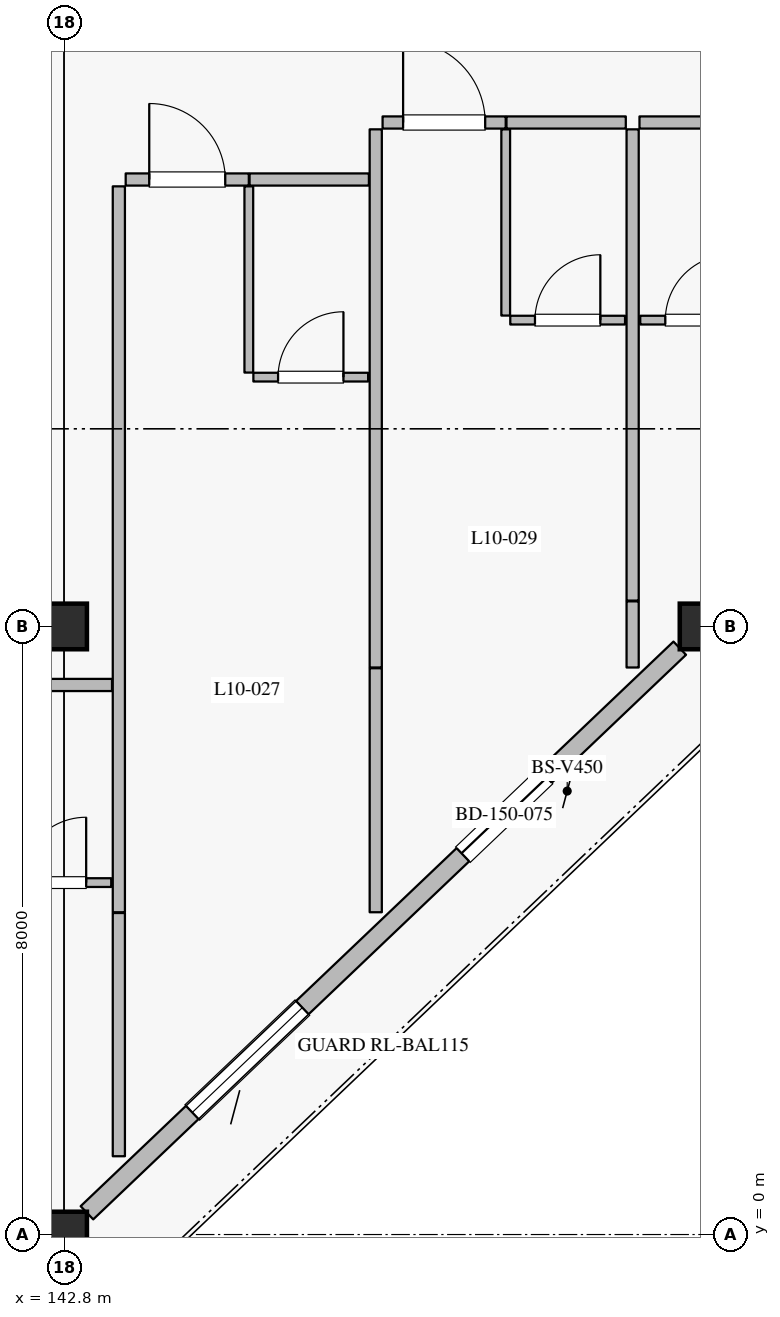
"""IFC4 building model, lengths in metres.
Left out: names, types, materials, properties, quantities, classifications, styles, units other than length and angle.
Written with IfcOpenShell. Run it as: python <this file> out.ifc"""

import sys

from ifc_helpers import new_model, si_unit, direction, frame, frame_2d, origin, origin_2d, place, context, subcontext, project, spatial, rectangle, extrude, element, fill, save


model = new_model("IFC4")
c1 = context("Model", 3, precision=1e-05, world=origin(), true_north=direction((0.0, 1.0)))
c2 = subcontext(c1, "Body", "Model", "MODEL_VIEW")
j1 = project(units=[si_unit("LENGTHUNIT", "METRE"), si_unit("PLANEANGLEUNIT", "RADIAN")], contexts=[c1])
p1 = place(None, origin())
s1 = spatial("IfcSite", under=j1, at=p1, CompositionType="ELEMENT")
p2 = place(p1, origin())
s2 = spatial("IfcBuilding", under=s1, at=p2, CompositionType="ELEMENT")
p3 = place(p2, frame((0.0, 0.0, 43.2)))
s3 = spatial("IfcBuildingStorey", under=s2, at=p3, CompositionType="ELEMENT", Elevation=43.2)
for number, where, z_axis, x_axis in (
    (1, (142.8, 0.0, 0.0), (0.0, 0.0, 1.0), (1.0, 0.0, 0.0)),
    (2, (151.2, 8.0, 0.0), (0.0, 0.0, 1.0), (1.0, 0.0, 0.0)),
    (3, (142.8, 8.0, 0.0), (0.0, 0.0, 1.0), (1.0, 0.0, 0.0)),
):
    element("IfcColumn", number, at=place(p3, frame(where, z_axis=z_axis, x_axis=x_axis)), inside=s3, PredefinedType="COLUMN", context=c2, shape_type="SweptSolid", body=[
        extrude(rectangle(XDim=0.6, YDim=0.6, at=origin_2d()), origin(), (0.0, 0.0, 1.0), 4.2),
    ])
p4 = place(p3, frame((150.9, 7.714, 0.0), z_axis=(0.0, 0.0, 1.0), x_axis=(-0.724145477467, -0.689647248573, 0.0)))
e4 = element("IfcWall", 4, at=p4, inside=s3, PredefinedType="SOLIDWALL", context=c2, shape_type="SweptSolid", body=[
    extrude(rectangle(XDim=10.771, YDim=0.24, at=frame_2d((5.385, 0.0))), origin(), (0.0, 0.0, 1.0), 3.54),
])
p5 = place(p4, frame((2.44, 0.0, 0.0)))
e5 = element("IfcOpeningElement", 5, at=p5, cuts=e4, PredefinedType="OPENING", context=c2, shape_type="SweptSolid", body=[
    extrude(rectangle(XDim=1.5, YDim=2.25, at=frame_2d((0.75, 1.125))), frame((0.0, 0.13, 0.0), z_axis=(0.0, -1.0, 0.0), x_axis=(1.0, 0.0, 0.0)), (0.0, 0.0, 1.0), 0.26),
])
p6 = place(p4, frame((6.857, 0.0, 0.8)))
e6 = element("IfcOpeningElement", 6, at=p6, cuts=e4, PredefinedType="OPENING", context=c2, shape_type="SweptSolid", body=[
    extrude(rectangle(XDim=2.0, YDim=1.75, at=frame_2d((1.0, 0.875))), frame((0.0, 0.13, 0.0), z_axis=(0.0, -1.0, 0.0), x_axis=(1.0, 0.0, 0.0)), (0.0, 0.0, 1.0), 0.26),
])
p7 = place(p3, frame((141.85, 7.23, 0.0), z_axis=(0.0, 0.0, 1.0), x_axis=(1.0, 0.0, 0.0)))
e7 = element("IfcWall", 7, at=p7, inside=s3, PredefinedType="PARTITIONING", context=c2, shape_type="SweptSolid", body=[
    extrude(rectangle(XDim=1.58, YDim=0.16, at=frame_2d((0.79, 0.0))), origin(), (0.0, 0.0, 1.0), 3.935),
])
p8 = place(p3, frame((141.9, 4.63, 0.0), z_axis=(0.0, 0.0, 1.0), x_axis=(1.0, 0.0, 0.0)))
e8 = element("IfcWall", 8, at=p8, inside=s3, PredefinedType="PARTITIONING", context=c2, shape_type="SweptSolid", body=[
    extrude(rectangle(XDim=1.52, YDim=0.115, at=frame_2d((0.76, 0.0))), origin(), (0.0, 0.0, 1.0), 3.935),
])
p9 = place(p8, frame((0.33, 0.0, 0.0)))
e9 = element("IfcOpeningElement", 9, at=p9, cuts=e8, PredefinedType="OPENING", context=c2, shape_type="SweptSolid", body=[
    extrude(rectangle(XDim=0.86, YDim=2.12, at=frame_2d((0.43, 1.06))), frame((0.0, 0.067, 0.0), z_axis=(0.0, -1.0, 0.0), x_axis=(1.0, 0.0, 0.0)), (0.0, 0.0, 1.0), 0.135),
])
p10 = place(p3, frame((143.52, 1.03, 0.0), z_axis=(0.0, 0.0, 1.0), x_axis=(0.0, 1.0, 0.0)))
e10 = element("IfcWall", 10, at=p10, inside=s3, PredefinedType="PARTITIONING", context=c2, shape_type="SweptSolid", body=[
    extrude(rectangle(XDim=3.2, YDim=0.16, at=frame_2d((1.6, 0.0))), origin(), (0.0, 0.0, 1.0), 3.935),
])
p11 = place(p3, frame((143.61, 13.88, 0.0), z_axis=(0.0, 0.0, 1.0), x_axis=(1.0, 0.0, 0.0)))
e11 = element("IfcWall", 11, at=p11, inside=s3, PredefinedType="PARTITIONING", context=c2, shape_type="SweptSolid", body=[
    extrude(rectangle(XDim=1.62, YDim=0.16, at=frame_2d((0.81, 0.0))), origin(), (0.0, 0.0, 1.0), 3.935),
])
p12 = place(p11, frame((0.31, 0.0, 0.0)))
e12 = element("IfcOpeningElement", 12, at=p12, cuts=e11, PredefinedType="OPENING", context=c2, shape_type="SweptSolid", body=[
    extrude(rectangle(XDim=1.0, YDim=2.25, at=frame_2d((0.5, 1.125))), frame((0.0, 0.09, 0.0), z_axis=(0.0, -1.0, 0.0), x_axis=(1.0, 0.0, 0.0)), (0.0, 0.0, 1.0), 0.18),
])
p13 = place(p3, frame((145.24, 13.88, 0.0), z_axis=(0.0, 0.0, 1.0), x_axis=(1.0, 0.0, 0.0)))
e13 = element("IfcWall", 13, at=p13, inside=s3, PredefinedType="PARTITIONING", context=c2, shape_type="SweptSolid", body=[
    extrude(rectangle(XDim=1.57, YDim=0.16, at=frame_2d((0.785, 0.0))), origin(), (0.0, 0.0, 1.0), 3.935),
])
p14 = place(p3, frame((145.23, 11.34, 0.0), z_axis=(0.0, 0.0, 1.0), x_axis=(0.0, 1.0, 0.0)))
e14 = element("IfcWall", 14, at=p14, inside=s3, PredefinedType="PARTITIONING", context=c2, shape_type="SweptSolid", body=[
    extrude(rectangle(XDim=2.45, YDim=0.115, at=frame_2d((1.225, 0.0))), origin(), (0.0, 0.0, 1.0), 3.935),
])
p15 = place(p3, frame((145.29, 11.28, 0.0), z_axis=(0.0, 0.0, 1.0), x_axis=(1.0, 0.0, 0.0)))
e15 = element("IfcWall", 15, at=p15, inside=s3, PredefinedType="PARTITIONING", context=c2, shape_type="SweptSolid", body=[
    extrude(rectangle(XDim=1.51, YDim=0.115, at=frame_2d((0.755, 0.0))), origin(), (0.0, 0.0, 1.0), 3.935),
])
p16 = place(p15, frame((0.325, 0.0, 0.0)))
e16 = element("IfcOpeningElement", 16, at=p16, cuts=e15, PredefinedType="OPENING", context=c2, shape_type="SweptSolid", body=[
    extrude(rectangle(XDim=0.86, YDim=2.12, at=frame_2d((0.43, 1.06))), frame((0.0, 0.067, 0.0), z_axis=(0.0, -1.0, 0.0), x_axis=(1.0, 0.0, 0.0)), (0.0, 0.0, 1.0), 0.135),
])
p17 = place(p3, frame((143.52, 4.24, 0.0), z_axis=(0.0, 0.0, 1.0), x_axis=(0.0, 1.0, 0.0)))
e17 = element("IfcWall", 17, at=p17, inside=s3, PredefinedType="PARTITIONING", context=c2, shape_type="SweptSolid", body=[
    extrude(rectangle(XDim=9.55, YDim=0.16, at=frame_2d((4.775, 0.0))), origin(), (0.0, 0.0, 1.0), 3.935),
])
p18 = place(p3, frame((146.9, 4.24, 0.0), z_axis=(0.0, 0.0, 1.0), x_axis=(0.0, 1.0, 0.0)))
e18 = element("IfcWall", 18, at=p18, inside=s3, PredefinedType="PARTITIONING", context=c2, shape_type="SweptSolid", body=[
    extrude(rectangle(XDim=3.21, YDim=0.16, at=frame_2d((1.605, 0.0))), origin(), (0.0, 0.0, 1.0), 3.935),
])
p19 = place(p3, frame((146.99, 14.63, 0.0), z_axis=(0.0, 0.0, 1.0), x_axis=(1.0, 0.0, 0.0)))
e19 = element("IfcWall", 19, at=p19, inside=s3, PredefinedType="PARTITIONING", context=c2, shape_type="SweptSolid", body=[
    extrude(rectangle(XDim=1.62, YDim=0.16, at=frame_2d((0.81, 0.0))), origin(), (0.0, 0.0, 1.0), 3.935),
])
p20 = place(p19, frame((0.27, 0.0, 0.0)))
e20 = element("IfcOpeningElement", 20, at=p20, cuts=e19, PredefinedType="OPENING", context=c2, shape_type="SweptSolid", body=[
    extrude(rectangle(XDim=1.08, YDim=2.3, at=frame_2d((0.54, 1.15))), frame((0.0, 0.09, 0.0), z_axis=(0.0, -1.0, 0.0), x_axis=(1.0, 0.0, 0.0)), (0.0, 0.0, 1.0), 0.18),
])
p21 = place(p3, frame((148.62, 14.63, 0.0), z_axis=(0.0, 0.0, 1.0), x_axis=(1.0, 0.0, 0.0)))
e21 = element("IfcWall", 21, at=p21, inside=s3, PredefinedType="PARTITIONING", context=c2, shape_type="SweptSolid", body=[
    extrude(rectangle(XDim=1.57, YDim=0.16, at=frame_2d((0.785, 0.0))), origin(), (0.0, 0.0, 1.0), 3.935),
])
p22 = place(p3, frame((148.61, 12.09, 0.0), z_axis=(0.0, 0.0, 1.0), x_axis=(0.0, 1.0, 0.0)))
e22 = element("IfcWall", 22, at=p22, inside=s3, PredefinedType="PARTITIONING", context=c2, shape_type="SweptSolid", body=[
    extrude(rectangle(XDim=2.45, YDim=0.115, at=frame_2d((1.225, 0.0))), origin(), (0.0, 0.0, 1.0), 3.935),
])
p23 = place(p3, frame((148.67, 12.03, 0.0), z_axis=(0.0, 0.0, 1.0), x_axis=(1.0, 0.0, 0.0)))
e23 = element("IfcWall", 23, at=p23, inside=s3, PredefinedType="PARTITIONING", context=c2, shape_type="SweptSolid", body=[
    extrude(rectangle(XDim=1.51, YDim=0.115, at=frame_2d((0.755, 0.0))), origin(), (0.0, 0.0, 1.0), 3.935),
])
p24 = place(p23, frame((0.325, 0.0, 0.0)))
e24 = element("IfcOpeningElement", 24, at=p24, cuts=e23, PredefinedType="OPENING", context=c2, shape_type="SweptSolid", body=[
    extrude(rectangle(XDim=0.86, YDim=2.12, at=frame_2d((0.43, 1.06))), frame((0.0, 0.067, 0.0), z_axis=(0.0, -1.0, 0.0), x_axis=(1.0, 0.0, 0.0)), (0.0, 0.0, 1.0), 0.135),
])
p25 = place(p3, frame((146.9, 7.46, 0.0), z_axis=(0.0, 0.0, 1.0), x_axis=(0.0, 1.0, 0.0)))
e25 = element("IfcWall", 25, at=p25, inside=s3, PredefinedType="PARTITIONING", context=c2, shape_type="SweptSolid", body=[
    extrude(rectangle(XDim=7.08, YDim=0.16, at=frame_2d((3.54, 0.0))), origin(), (0.0, 0.0, 1.0), 3.935),
])
p26 = place(p3, frame((150.28, 7.46, 0.0), z_axis=(0.0, 0.0, 1.0), x_axis=(0.0, 1.0, 0.0)))
e26 = element("IfcWall", 26, at=p26, inside=s3, PredefinedType="PARTITIONING", context=c2, shape_type="SweptSolid", body=[
    extrude(rectangle(XDim=0.87, YDim=0.16, at=frame_2d((0.435, 0.0))), origin(), (0.0, 0.0, 1.0), 3.935),
])
p27 = place(p3, frame((150.37, 14.63, 0.0), z_axis=(0.0, 0.0, 1.0), x_axis=(1.0, 0.0, 0.0)))
e27 = element("IfcWall", 27, at=p27, inside=s3, PredefinedType="PARTITIONING", context=c2, shape_type="SweptSolid", body=[
    extrude(rectangle(XDim=1.58, YDim=0.16, at=frame_2d((0.79, 0.0))), origin(), (0.0, 0.0, 1.0), 3.935),
])
p28 = place(p3, frame((150.38, 12.03, 0.0), z_axis=(0.0, 0.0, 1.0), x_axis=(1.0, 0.0, 0.0)))
e28 = element("IfcWall", 28, at=p28, inside=s3, PredefinedType="PARTITIONING", context=c2, shape_type="SweptSolid", body=[
    extrude(rectangle(XDim=1.52, YDim=0.115, at=frame_2d((0.76, 0.0))), origin(), (0.0, 0.0, 1.0), 3.935),
])
p29 = place(p28, frame((0.33, 0.0, 0.0)))
e29 = element("IfcOpeningElement", 29, at=p29, cuts=e28, PredefinedType="OPENING", context=c2, shape_type="SweptSolid", body=[
    extrude(rectangle(XDim=0.86, YDim=2.12, at=frame_2d((0.43, 1.06))), frame((0.0, 0.067, 0.0), z_axis=(0.0, -1.0, 0.0), x_axis=(1.0, 0.0, 0.0)), (0.0, 0.0, 1.0), 0.135),
])
p30 = place(p3, frame((150.28, 8.34, 0.0), z_axis=(0.0, 0.0, 1.0), x_axis=(0.0, 1.0, 0.0)))
e30 = element("IfcWall", 30, at=p30, inside=s3, PredefinedType="PARTITIONING", context=c2, shape_type="SweptSolid", body=[
    extrude(rectangle(XDim=6.2, YDim=0.16, at=frame_2d((3.1, 0.0))), origin(), (0.0, 0.0, 1.0), 3.935),
])
p31 = place(p5, origin())
e31 = element("IfcDoor", 31, at=p31, inside=s3, OperationType="SLIDING_TO_LEFT", PredefinedType="DOOR", context=c2, shape_type="SweptSolid", body=[
    extrude(rectangle(XDim=1.5, YDim=2.25, at=frame_2d((0.75, 1.125))), frame((0.0, 0.025, 0.0), z_axis=(0.0, -1.0, 0.0), x_axis=(1.0, 0.0, 0.0)), (0.0, 0.0, 1.0), 0.05),
])
fill(e5, e31)
p32 = place(p6, origin())
e32 = element("IfcWindow", 32, at=p32, inside=s3, PartitioningType="DOUBLE_PANEL_VERTICAL", PredefinedType="WINDOW", context=c2, shape_type="SweptSolid", body=[
    extrude(rectangle(XDim=2.0, YDim=1.75, at=frame_2d((1.0, 0.875))), frame((0.0, 0.03, 0.0), z_axis=(0.0, -1.0, 0.0), x_axis=(1.0, 0.0, 0.0)), (0.0, 0.0, 1.0), 0.06),
])
fill(e6, e32)
p33 = place(p9, origin())
e33 = element("IfcDoor", 33, at=p33, inside=s3, OperationType="SINGLE_SWING_RIGHT", PredefinedType="DOOR", context=c2, shape_type="SweptSolid", body=[
    extrude(rectangle(XDim=0.86, YDim=2.12, at=frame_2d((0.43, 1.06))), frame((0.0, 0.025, 0.0), z_axis=(0.0, -1.0, 0.0), x_axis=(1.0, 0.0, 0.0)), (0.0, 0.0, 1.0), 0.05),
])
fill(e9, e33)
p34 = place(p12, origin())
e34 = element("IfcDoor", 34, at=p34, inside=s3, OperationType="SINGLE_SWING_LEFT", PredefinedType="DOOR", context=c2, shape_type="SweptSolid", body=[
    extrude(rectangle(XDim=1.0, YDim=2.25, at=frame_2d((0.5, 1.125))), frame((0.0, 0.025, 0.0), z_axis=(0.0, -1.0, 0.0), x_axis=(1.0, 0.0, 0.0)), (0.0, 0.0, 1.0), 0.05),
])
fill(e12, e34)
p35 = place(p16, origin())
e35 = element("IfcDoor", 35, at=p35, inside=s3, OperationType="SINGLE_SWING_RIGHT", PredefinedType="DOOR", context=c2, shape_type="SweptSolid", body=[
    extrude(rectangle(XDim=0.86, YDim=2.12, at=frame_2d((0.43, 1.06))), frame((0.0, 0.025, 0.0), z_axis=(0.0, -1.0, 0.0), x_axis=(1.0, 0.0, 0.0)), (0.0, 0.0, 1.0), 0.05),
])
fill(e16, e35)
p36 = place(p20, origin())
e36 = element("IfcDoor", 36, at=p36, inside=s3, OperationType="SINGLE_SWING_LEFT", PredefinedType="DOOR", context=c2, shape_type="SweptSolid", body=[
    extrude(rectangle(XDim=1.08, YDim=2.3, at=frame_2d((0.54, 1.15))), frame((0.0, 0.025, 0.0), z_axis=(0.0, -1.0, 0.0), x_axis=(1.0, 0.0, 0.0)), (0.0, 0.0, 1.0), 0.05),
])
fill(e20, e36)
p37 = place(p24, origin())
e37 = element("IfcDoor", 37, at=p37, inside=s3, OperationType="SINGLE_SWING_RIGHT", PredefinedType="DOOR", context=c2, shape_type="SweptSolid", body=[
    extrude(rectangle(XDim=0.86, YDim=2.12, at=frame_2d((0.43, 1.06))), frame((0.0, 0.025, 0.0), z_axis=(0.0, -1.0, 0.0), x_axis=(1.0, 0.0, 0.0)), (0.0, 0.0, 1.0), 0.05),
])
fill(e24, e37)
p38 = place(p29, origin())
e38 = element("IfcDoor", 38, at=p38, inside=s3, OperationType="SINGLE_SWING_RIGHT", PredefinedType="DOOR", context=c2, shape_type="SweptSolid", body=[
    extrude(rectangle(XDim=0.86, YDim=2.12, at=frame_2d((0.43, 1.06))), frame((0.0, 0.025, 0.0), z_axis=(0.0, -1.0, 0.0), x_axis=(1.0, 0.0, 0.0)), (0.0, 0.0, 1.0), 0.05),
])
fill(e29, e38)
save(model, sys.argv[1])
